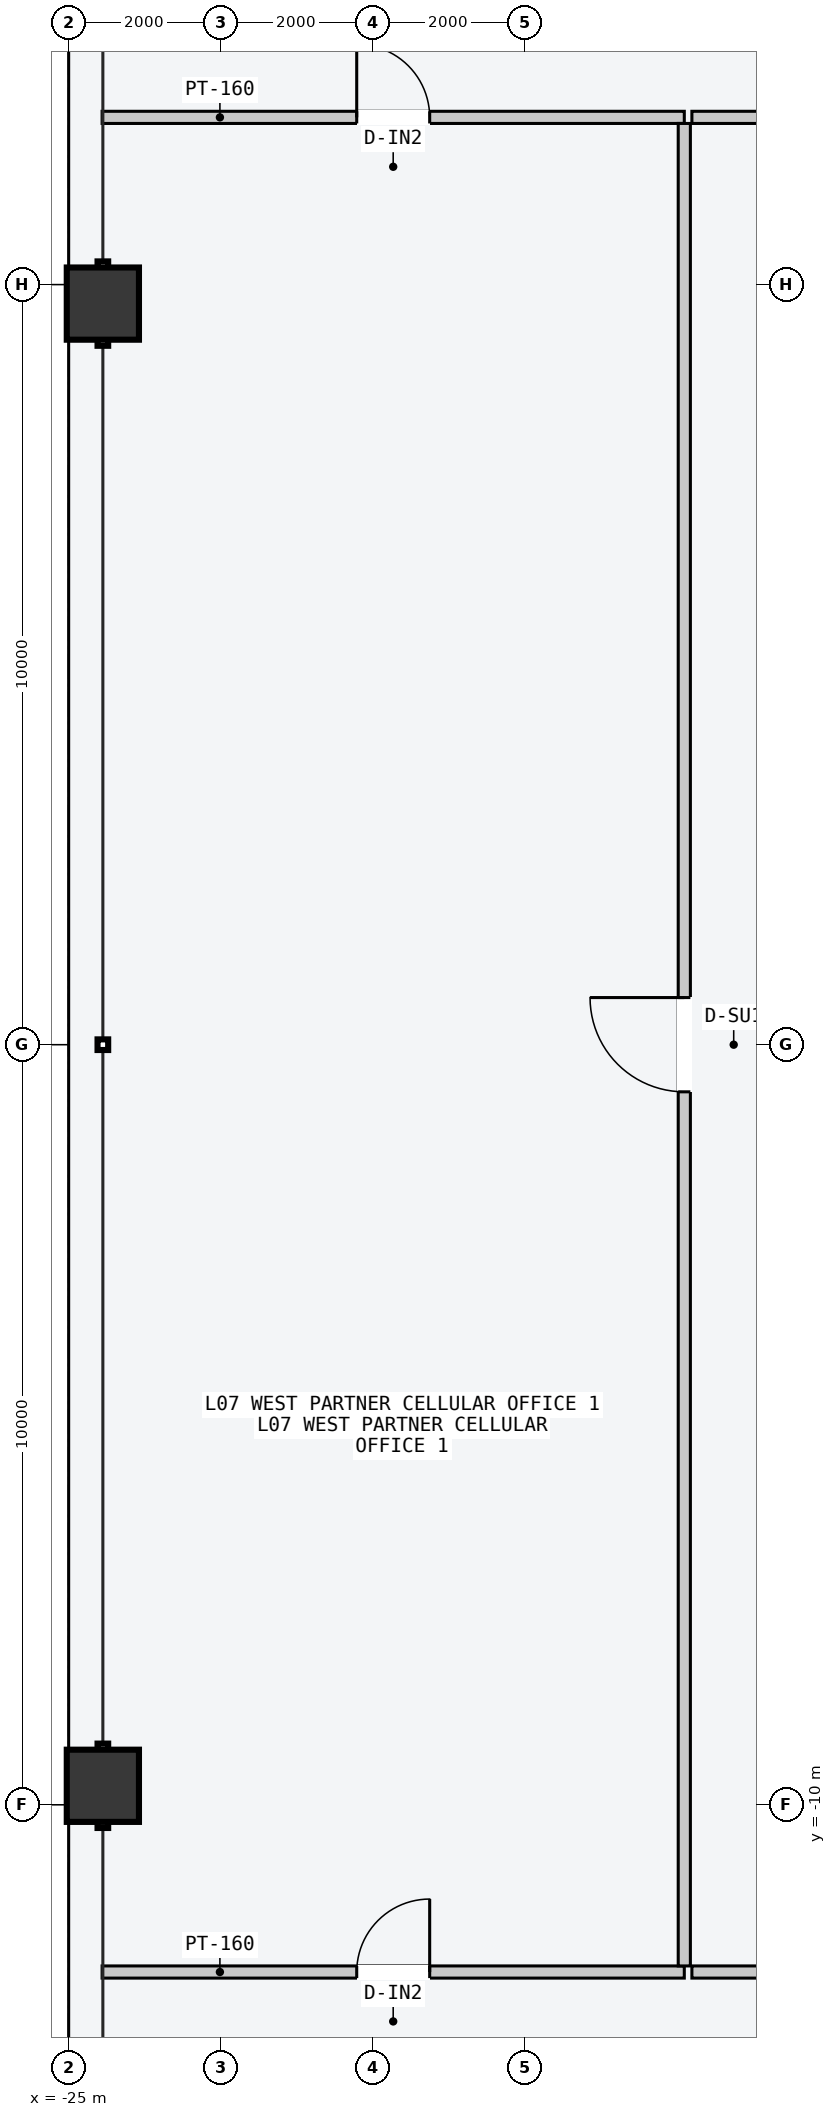
"""IFC4 building model, lengths in metres.
Left out: names, types, materials, properties, quantities, classifications, styles, units other than length and angle.
Written with IfcOpenShell. Run it as: python <this file> out.ifc"""

import sys

from ifc_helpers import new_model, si_unit, direction, frame, frame_2d, origin, origin_2d, place, context, subcontext, project, spatial, rectangle, hollow_rectangle, extrude, element, fill, save


model = new_model("IFC4")
c1 = context("Model", 3, precision=1e-05, world=origin(), true_north=direction((0.0, 1.0)))
c2 = subcontext(c1, "Body", "Model", "MODEL_VIEW")
j1 = project(units=[si_unit("LENGTHUNIT", "METRE"), si_unit("PLANEANGLEUNIT", "RADIAN")], contexts=[c1])
p1 = place(None, origin())
s1 = spatial("IfcSite", under=j1, at=p1, CompositionType="ELEMENT")
p2 = place(p1, origin())
s2 = spatial("IfcBuilding", under=s1, at=p2, CompositionType="ELEMENT")
p3 = place(p2, frame((0.0, 0.0, 31.2)))
s3 = spatial("IfcBuildingStorey", under=s2, at=p3, CompositionType="ELEMENT", Elevation=31.2)
for number, where, z_axis, x_axis in (
    (1, (-24.55, -9.75, 0.0), (0.0, 0.0, 1.0), (0.0, 1.0, 0.0)),
    (2, (-24.55, 9.75, 0.0), (0.0, 0.0, 1.0), (0.0, 1.0, 0.0)),
):
    element("IfcColumn", number, at=place(p3, frame(where, z_axis=z_axis, x_axis=x_axis)), inside=s3, PredefinedType="COLUMN", context=c2, shape_type="SweptSolid", body=[
        extrude(hollow_rectangle(XDim=0.95, YDim=0.95, WallThickness=0.048, at=origin_2d()), origin(), (0.0, 0.0, 1.0), 3.6),
    ])
p4 = place(p3, frame((-16.8, 12.2, 0.0), z_axis=(0.0, 0.0, 1.0), x_axis=(1.0, 0.0, 0.0)))
e3 = element("IfcWall", 3, at=p4, inside=s3, PredefinedType="PARTITIONING", context=c2, shape_type="SweptSolid", body=[
    extrude(rectangle(XDim=33.6, YDim=0.16, at=frame_2d((16.8, 0.0))), origin(), (0.0, 0.0, 1.0), 3.4),
])
p5 = place(p4, frame((4.684, 0.0, 0.0)))
e4 = element("IfcOpeningElement", 4, at=p5, cuts=e3, PredefinedType="OPENING", context=c2, shape_type="SweptSolid", body=[
    extrude(rectangle(XDim=1.06, YDim=2.2, at=frame_2d((0.53, 1.1))), frame((0.0, 0.09, 0.0), z_axis=(0.0, -1.0, 0.0), x_axis=(1.0, 0.0, 0.0)), (0.0, 0.0, 1.0), 0.18),
])
p6 = place(p4, frame((21.394, 0.0, 0.0)))
e5 = element("IfcOpeningElement", 5, at=p6, cuts=e3, PredefinedType="OPENING", context=c2, shape_type="SweptSolid", body=[
    extrude(rectangle(XDim=1.24, YDim=2.24, at=frame_2d((0.62, 1.12))), frame((0.0, 0.09, 0.0), z_axis=(0.0, -1.0, 0.0), x_axis=(1.0, 0.0, 0.0)), (0.0, 0.0, 1.0), 0.18),
])
p7 = place(p3, frame((-24.56, 12.2, 0.0), z_axis=(0.0, 0.0, 1.0), x_axis=(1.0, 0.0, 0.0)))
e6 = element("IfcWall", 6, at=p7, inside=s3, PredefinedType="PARTITIONING", context=c2, shape_type="SweptSolid", body=[
    extrude(rectangle(XDim=7.66, YDim=0.16, at=frame_2d((3.83, 0.0))), origin(), (0.0, 0.0, 1.0), 3.4),
])
p8 = place(p7, frame((3.35, 0.0, 0.0)))
e7 = element("IfcOpeningElement", 7, at=p8, cuts=e6, PredefinedType="OPENING", context=c2, shape_type="SweptSolid", body=[
    extrude(rectangle(XDim=0.96, YDim=2.18, at=frame_2d((0.48, 1.09))), frame((0.0, 0.09, 0.0), z_axis=(0.0, -1.0, 0.0), x_axis=(1.0, 0.0, 0.0)), (0.0, 0.0, 1.0), 0.18),
])
p9 = place(p3, frame((-16.8, -12.2, 0.0), z_axis=(0.0, 0.0, 1.0), x_axis=(1.0, 0.0, 0.0)))
e8 = element("IfcWall", 8, at=p9, inside=s3, PredefinedType="PARTITIONING", context=c2, shape_type="SweptSolid", body=[
    extrude(rectangle(XDim=33.6, YDim=0.16, at=frame_2d((16.8, 0.0))), origin(), (0.0, 0.0, 1.0), 3.4),
])
p10 = place(p9, frame((6.755, 0.0, 0.0)))
e9 = element("IfcOpeningElement", 9, at=p10, cuts=e8, PredefinedType="OPENING", context=c2, shape_type="SweptSolid", body=[
    extrude(rectangle(XDim=0.9, YDim=2.15, at=frame_2d((0.45, 1.075))), frame((0.0, 0.09, 0.0), z_axis=(0.0, -1.0, 0.0), x_axis=(1.0, 0.0, 0.0)), (0.0, 0.0, 1.0), 0.18),
])
p11 = place(p9, frame((20.103, 0.0, 0.0)))
e10 = element("IfcOpeningElement", 10, at=p11, cuts=e8, PredefinedType="OPENING", context=c2, shape_type="SweptSolid", body=[
    extrude(rectangle(XDim=0.96, YDim=2.18, at=frame_2d((0.48, 1.09))), frame((0.0, 0.09, 0.0), z_axis=(0.0, -1.0, 0.0), x_axis=(1.0, 0.0, 0.0)), (0.0, 0.0, 1.0), 0.18),
])
p12 = place(p9, frame((29.667, 0.0, 0.0)))
e11 = element("IfcOpeningElement", 11, at=p12, cuts=e8, PredefinedType="OPENING", context=c2, shape_type="SweptSolid", body=[
    extrude(rectangle(XDim=1.02, YDim=2.2, at=frame_2d((0.51, 1.1))), frame((0.0, 0.09, 0.0), z_axis=(0.0, -1.0, 0.0), x_axis=(1.0, 0.0, 0.0)), (0.0, 0.0, 1.0), 0.18),
])
p13 = place(p3, frame((-24.56, -12.2, 0.0), z_axis=(0.0, 0.0, 1.0), x_axis=(1.0, 0.0, 0.0)))
e12 = element("IfcWall", 12, at=p13, inside=s3, PredefinedType="PARTITIONING", context=c2, shape_type="SweptSolid", body=[
    extrude(rectangle(XDim=7.66, YDim=0.16, at=frame_2d((3.83, 0.0))), origin(), (0.0, 0.0, 1.0), 3.4),
])
p14 = place(p13, frame((3.35, 0.0, 0.0)))
e13 = element("IfcOpeningElement", 13, at=p14, cuts=e12, PredefinedType="OPENING", context=c2, shape_type="SweptSolid", body=[
    extrude(rectangle(XDim=0.96, YDim=2.18, at=frame_2d((0.48, 1.09))), frame((0.0, 0.09, 0.0), z_axis=(0.0, -1.0, 0.0), x_axis=(1.0, 0.0, 0.0)), (0.0, 0.0, 1.0), 0.18),
])
p15 = place(p3, frame((-16.9, -12.12, 0.0), z_axis=(0.0, 0.0, 1.0), x_axis=(0.0, 1.0, 0.0)))
e14 = element("IfcWall", 14, at=p15, inside=s3, PredefinedType="PARTITIONING", context=c2, shape_type="SweptSolid", body=[
    extrude(rectangle(XDim=24.24, YDim=0.16, at=frame_2d((12.12, 0.0))), origin(), (0.0, 0.0, 1.0), 3.4),
])
p16 = place(p15, frame((11.5, 0.0, 0.0)))
e15 = element("IfcOpeningElement", 15, at=p16, cuts=e14, PredefinedType="OPENING", context=c2, shape_type="SweptSolid", body=[
    extrude(rectangle(XDim=1.24, YDim=2.24, at=frame_2d((0.62, 1.12))), frame((0.0, 0.09, 0.0), z_axis=(0.0, -1.0, 0.0), x_axis=(1.0, 0.0, 0.0)), (0.0, 0.0, 1.0), 0.18),
])
p17 = place(p8, origin())
e16 = element("IfcDoor", 16, at=p17, inside=s3, OperationType="SINGLE_SWING_LEFT", PredefinedType="DOOR", context=c2, shape_type="SweptSolid", body=[
    extrude(rectangle(XDim=0.96, YDim=2.18, at=frame_2d((0.48, 1.09))), frame((0.0, 0.025, 0.0), z_axis=(0.0, -1.0, 0.0), x_axis=(1.0, 0.0, 0.0)), (0.0, 0.0, 1.0), 0.05),
])
fill(e7, e16)
p18 = place(p14, origin())
e17 = element("IfcDoor", 17, at=p18, inside=s3, OperationType="SINGLE_SWING_RIGHT", PredefinedType="DOOR", context=c2, shape_type="SweptSolid", body=[
    extrude(rectangle(XDim=0.96, YDim=2.18, at=frame_2d((0.48, 1.09))), frame((0.0, 0.025, 0.0), z_axis=(0.0, -1.0, 0.0), x_axis=(1.0, 0.0, 0.0)), (0.0, 0.0, 1.0), 0.05),
])
fill(e13, e17)
p19 = place(p16, origin())
e18 = element("IfcDoor", 18, at=p19, inside=s3, OperationType="SINGLE_SWING_RIGHT", PredefinedType="DOOR", context=c2, shape_type="SweptSolid", body=[
    extrude(rectangle(XDim=1.24, YDim=2.24, at=frame_2d((0.62, 1.12))), frame((0.0, 0.025, 0.0), z_axis=(0.0, -1.0, 0.0), x_axis=(1.0, 0.0, 0.0)), (0.0, 0.0, 1.0), 0.05),
])
fill(e15, e18)
save(model, sys.argv[1])
